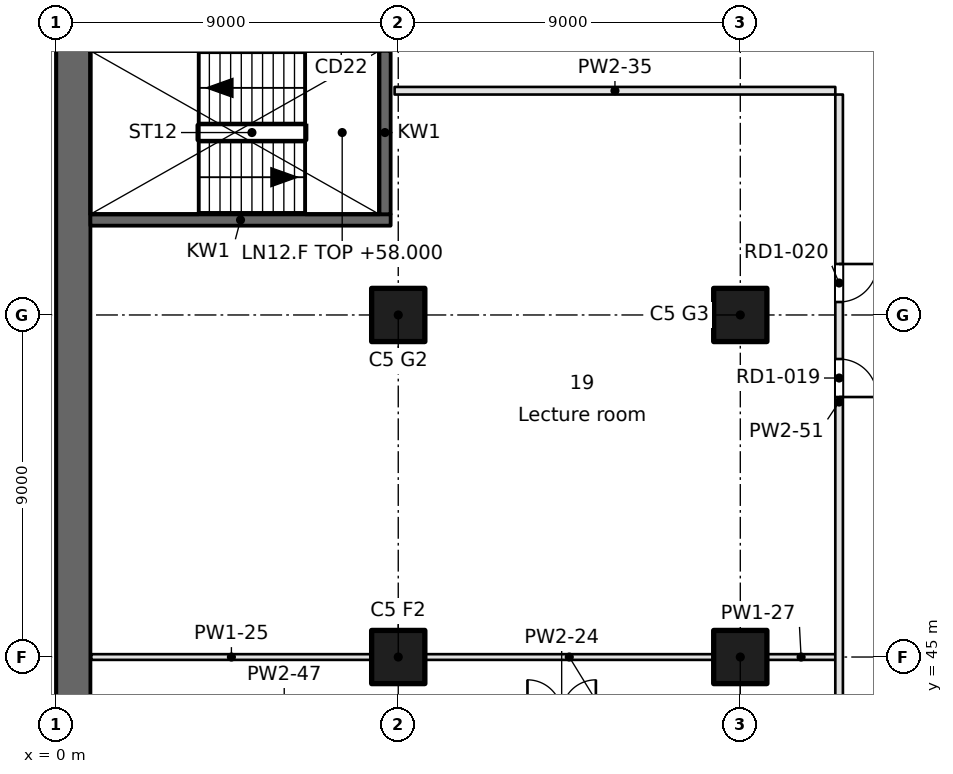
"""IFC4 building model, lengths in metres.
Left out: names, types, materials, properties, quantities, classifications, styles, units other than length and angle.
Written with IfcOpenShell. Run it as: python <this file> out.ifc"""

import sys

from ifc_helpers import new_model, si_unit, direction, frame, frame_2d, origin, origin_2d, place, context, subcontext, project, spatial, rectangle, extrude, element, fill, save


model = new_model("IFC4")
c1 = context("Model", 3, precision=1e-05, world=origin(), true_north=direction((0.0, 1.0)))
c2 = subcontext(c1, "Body", "Model", "MODEL_VIEW")
j1 = project(units=[si_unit("LENGTHUNIT", "METRE"), si_unit("PLANEANGLEUNIT", "RADIAN")], contexts=[c1])
p1 = place(None, origin())
s1 = spatial("IfcSite", under=j1, at=p1, CompositionType="ELEMENT")
p2 = place(p1, origin())
s2 = spatial("IfcBuilding", under=s1, at=p2, CompositionType="ELEMENT")
p3 = place(p2, frame((0.0, 0.0, 58.0)))
s3 = spatial("IfcBuildingStorey", under=s2, at=p3, CompositionType="ELEMENT", Elevation=58.0)
for number, where, z_axis, x_axis in (
    (1, (9.0, 45.0, 0.0), (0.0, 0.0, 1.0), (1.0, 0.0, 0.0)),
    (2, (9.0, 54.0, 0.0), (0.0, 0.0, 1.0), (1.0, 0.0, 0.0)),
    (3, (18.0, 45.0, 0.0), (0.0, 0.0, 1.0), (1.0, 0.0, 0.0)),
    (4, (18.0, 54.0, 0.0), (0.0, 0.0, 1.0), (1.0, 0.0, 0.0)),
):
    element("IfcColumn", number, at=place(p3, frame(where, z_axis=z_axis, x_axis=x_axis)), inside=s3, PredefinedType="COLUMN", context=c2, shape_type="SweptSolid", body=[
        extrude(rectangle(XDim=1.4, YDim=1.4, at=origin_2d()), origin(), (0.0, 0.0, 1.0), 3.7),
    ])
p4 = place(p3, frame((0.45, 94.5, 0.0), z_axis=(0.0, 0.0, 1.0), x_axis=(0.0, -1.0, 0.0)))
e5 = element("IfcWall", 5, at=p4, inside=s3, PredefinedType="SHEAR", context=c2, shape_type="SweptSolid", body=[
    extrude(rectangle(XDim=66.187, YDim=0.9, at=frame_2d((33.094, 0.0))), origin(), (0.0, 0.0, 1.0), 3.7),
])
p5 = place(p3, frame((0.9, 56.5, -0.4), z_axis=(0.0, 0.0, 1.0), x_axis=(1.0, 0.0, 0.0)))
e6 = element("IfcWall", 6, at=p5, inside=s3, PredefinedType="SOLIDWALL", context=c2, shape_type="SweptSolid", body=[
    extrude(rectangle(XDim=7.9, YDim=0.3, at=frame_2d((3.95, 0.0))), origin(), (0.0, 0.0, 1.0), 3.7),
])
p6 = place(p3, frame((8.65, 56.65, -0.4), z_axis=(0.0, 0.0, 1.0), x_axis=(0.0, 1.0, 0.0)))
e7 = element("IfcWall", 7, at=p6, inside=s3, PredefinedType="SOLIDWALL", context=c2, shape_type="SweptSolid", body=[
    extrude(rectangle(XDim=4.3, YDim=0.3, at=frame_2d((2.15, 0.0))), origin(), (0.0, 0.0, 1.0), 3.7),
])
p7 = place(p3, frame((0.92, 45.0, 0.0), z_axis=(0.0, 0.0, 1.0), x_axis=(1.0, 0.0, 0.0)))
e8 = element("IfcWall", 8, at=p7, inside=s3, PredefinedType="PARTITIONING", context=c2, shape_type="SweptSolid", body=[
    extrude(rectangle(XDim=7.38, YDim=0.15, at=frame_2d((3.69, 0.0))), origin(), (0.0, 0.0, 1.0), 3.3),
])
p8 = place(p3, frame((9.7, 45.0, 0.0), z_axis=(0.0, 0.0, 1.0), x_axis=(1.0, 0.0, 0.0)))
e9 = element("IfcWall", 9, at=p8, inside=s3, PredefinedType="PARTITIONING", context=c2, shape_type="SweptSolid", body=[
    extrude(rectangle(XDim=7.6, YDim=0.15, at=frame_2d((3.8, 0.0))), origin(), (0.0, 0.0, 1.0), 3.3),
])
p9 = place(p3, frame((18.7, 45.0, 0.0), z_axis=(0.0, 0.0, 1.0), x_axis=(1.0, 0.0, 0.0)))
e10 = element("IfcWall", 10, at=p9, inside=s3, PredefinedType="PARTITIONING", context=c2, shape_type="SweptSolid", body=[
    extrude(rectangle(XDim=1.8, YDim=0.15, at=frame_2d((0.9, 0.0))), origin(), (0.0, 0.0, 1.0), 3.3),
])
p10 = place(p3, frame((20.5, 59.9, 0.0), z_axis=(0.0, 0.0, 1.0), x_axis=(-1.0, 0.0, 0.0)))
e11 = element("IfcWall", 11, at=p10, inside=s3, PredefinedType="PARTITIONING", context=c2, shape_type="SweptSolid", body=[
    extrude(rectangle(XDim=11.596, YDim=0.2, at=frame_2d((5.798, 0.0))), origin(), (0.0, 0.0, 1.0), 3.3),
])
p11 = place(p3, frame((20.6, 43.618, 0.0), z_axis=(0.0, 0.0, 1.0), x_axis=(0.0, 1.0, 0.0)))
e12 = element("IfcWall", 12, at=p11, inside=s3, PredefinedType="PARTITIONING", context=c2, shape_type="SweptSolid", body=[
    extrude(rectangle(XDim=16.182, YDim=0.2, at=frame_2d((8.091, 0.0))), origin(), (0.0, 0.0, 1.0), 3.3),
])
p12 = place(p11, frame((8.223, 0.0, 0.0)))
e13 = element("IfcOpeningElement", 13, at=p12, cuts=e12, PredefinedType="OPENING", context=c2, shape_type="SweptSolid", body=[
    extrude(rectangle(XDim=1.0, YDim=2.1, at=frame_2d((0.5, 1.05))), frame((0.0, 0.1, 0.0), z_axis=(0.0, -1.0, 0.0), x_axis=(1.0, 0.0, 0.0)), (0.0, 0.0, 1.0), 0.2),
])
p13 = place(p11, frame((10.723, 0.0, 0.0)))
e14 = element("IfcOpeningElement", 14, at=p13, cuts=e12, PredefinedType="OPENING", context=c2, shape_type="SweptSolid", body=[
    extrude(rectangle(XDim=1.0, YDim=2.1, at=frame_2d((0.5, 1.05))), frame((0.0, 0.1, 0.0), z_axis=(0.0, -1.0, 0.0), x_axis=(1.0, 0.0, 0.0)), (0.0, 0.0, 1.0), 0.2),
])
p14 = place(p12, frame((1.0, 0.0, 0.0), z_axis=(0.0, 0.0, 1.0), x_axis=(-1.0, 0.0, 0.0)))
e15 = element("IfcDoor", 15, at=p14, inside=s3, OperationType="SINGLE_SWING_RIGHT", PredefinedType="DOOR", context=c2, shape_type="SweptSolid", body=[
    extrude(rectangle(XDim=1.0, YDim=2.1, at=frame_2d((0.5, 1.05))), frame((0.0, 0.025, 0.0), z_axis=(0.0, -1.0, 0.0), x_axis=(1.0, 0.0, 0.0)), (0.0, 0.0, 1.0), 0.05),
])
fill(e13, e15)
p15 = place(p13, frame((1.0, 0.0, 0.0), z_axis=(0.0, 0.0, 1.0), x_axis=(-1.0, 0.0, 0.0)))
e16 = element("IfcDoor", 16, at=p15, inside=s3, OperationType="SINGLE_SWING_LEFT", PredefinedType="DOOR", context=c2, shape_type="SweptSolid", body=[
    extrude(rectangle(XDim=1.0, YDim=2.1, at=frame_2d((0.5, 1.05))), frame((0.0, 0.025, 0.0), z_axis=(0.0, -1.0, 0.0), x_axis=(1.0, 0.0, 0.0)), (0.0, 0.0, 1.0), 0.05),
])
fill(e14, e16)
save(model, sys.argv[1])
